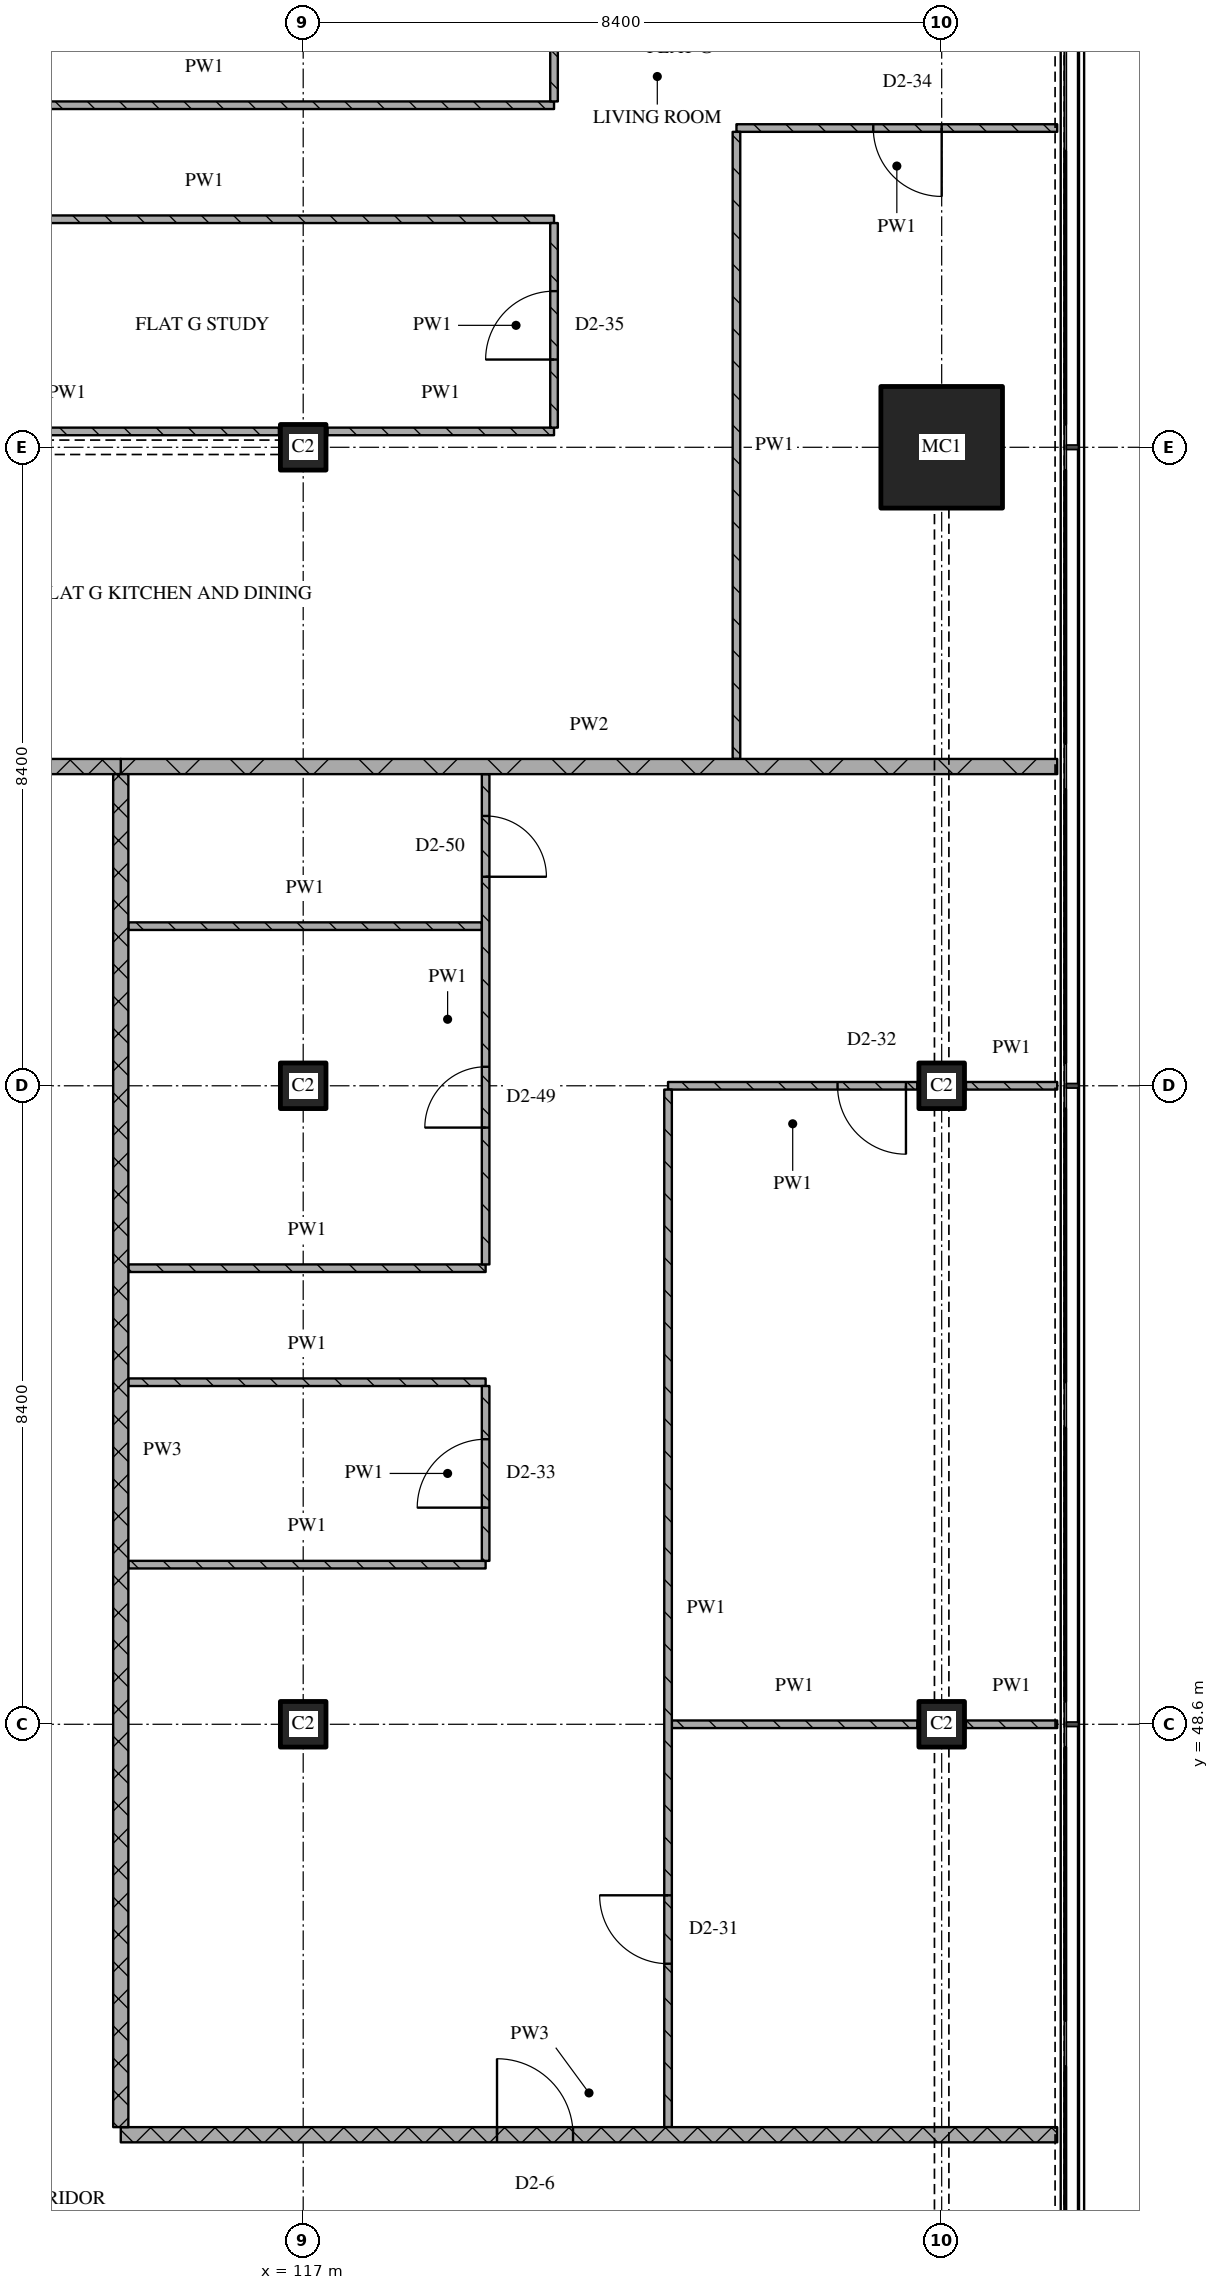
"""IFC4 building model, lengths in metres.
Left out: names, types, materials, properties, quantities, classifications, styles, units other than length and angle.
Written with IfcOpenShell. Run it as: python <this file> out.ifc"""

import sys

from ifc_helpers import new_model, si_unit, direction, frame, frame_2d, origin, origin_2d, place, context, subcontext, project, spatial, rectangle, extrude, element, fill, save


model = new_model("IFC4")
c1 = context("Model", 3, precision=1e-05, world=origin(), true_north=direction((0.0, 1.0)))
c2 = subcontext(c1, "Body", "Model", "MODEL_VIEW")
j1 = project(units=[si_unit("LENGTHUNIT", "METRE"), si_unit("PLANEANGLEUNIT", "RADIAN")], contexts=[c1])
p1 = place(None, origin())
s1 = spatial("IfcSite", under=j1, at=p1, CompositionType="ELEMENT")
p2 = place(p1, origin())
s2 = spatial("IfcBuilding", under=s1, at=p2, CompositionType="ELEMENT")
p3 = place(p2, frame((0.0, 0.0, 223.5)))
s3 = spatial("IfcBuildingStorey", under=s2, at=p3, CompositionType="ELEMENT", Elevation=223.5)
for number, where, z_axis, x_axis in (
    (1, (117.0, 48.6, 0.0), (0.0, 0.0, 1.0), (1.0, 0.0, 0.0)),
    (2, (117.0, 57.0, 0.0), (0.0, 0.0, 1.0), (1.0, 0.0, 0.0)),
    (3, (117.0, 65.4, 0.0), (0.0, 0.0, 1.0), (1.0, 0.0, 0.0)),
    (4, (125.4, 48.6, 0.0), (0.0, 0.0, 1.0), (1.0, 0.0, 0.0)),
    (5, (125.4, 57.0, 0.0), (0.0, 0.0, 1.0), (1.0, 0.0, 0.0)),
):
    element("IfcColumn", number, at=place(p3, frame(where, z_axis=z_axis, x_axis=x_axis)), inside=s3, PredefinedType="COLUMN", context=c2, shape_type="SweptSolid", body=[
        extrude(rectangle(XDim=0.6, YDim=0.6, at=origin_2d()), origin(), (0.0, 0.0, 1.0), 3.6),
    ])
p4 = place(p3, frame((125.4, 65.4, 0.0), z_axis=(0.0, 0.0, 1.0), x_axis=(1.0, 0.0, 0.0)))
e6 = element("IfcColumn", 6, at=p4, inside=s3, PredefinedType="COLUMN", context=c2, shape_type="SweptSolid", body=[
    extrude(rectangle(XDim=1.6, YDim=1.6, at=origin_2d()), origin(), (0.0, 0.0, 1.0), 3.6),
])
p5 = place(p3, frame((114.6, 43.2, 0.0), z_axis=(0.0, 0.0, 1.0), x_axis=(1.0, 0.0, 0.0)))
e7 = element("IfcWall", 7, at=p5, inside=s3, PredefinedType="PARTITIONING", context=c2, shape_type="SweptSolid", body=[
    extrude(rectangle(XDim=12.32, YDim=0.2, at=frame_2d((6.16, 0.0))), origin(), (0.0, 0.0, 1.0), 3.32),
])
p6 = place(p5, frame((4.95, 0.0, 0.0)))
e8 = element("IfcOpeningElement", 8, at=p6, cuts=e7, PredefinedType="OPENING", context=c2, shape_type="SweptSolid", body=[
    extrude(rectangle(XDim=1.0, YDim=2.1, at=frame_2d((0.5, 1.05))), frame((0.0, 0.11, 0.0), z_axis=(0.0, -1.0, 0.0), x_axis=(1.0, 0.0, 0.0)), (0.0, 0.0, 1.0), 0.22),
])
p7 = place(p3, frame((121.85, 48.6, 0.0), z_axis=(0.0, 0.0, 1.0), x_axis=(1.0, 0.0, 0.0)))
e9 = element("IfcWall", 9, at=p7, inside=s3, PredefinedType="PARTITIONING", context=c2, shape_type="SweptSolid", body=[
    extrude(rectangle(XDim=3.23, YDim=0.1, at=frame_2d((1.615, 0.0))), origin(), (0.0, 0.0, 1.0), 3.32),
])
p8 = place(p3, frame((125.72, 48.6, 0.0), z_axis=(0.0, 0.0, 1.0), x_axis=(1.0, 0.0, 0.0)))
e10 = element("IfcWall", 10, at=p8, inside=s3, PredefinedType="PARTITIONING", context=c2, shape_type="SweptSolid", body=[
    extrude(rectangle(XDim=1.2, YDim=0.1, at=frame_2d((0.6, 0.0))), origin(), (0.0, 0.0, 1.0), 3.32),
])
for number, where, z_axis, x_axis in (
    (11, (114.7, 50.7, 0.0), (0.0, 0.0, 1.0), (1.0, 0.0, 0.0)),
    (12, (114.7, 53.1, 0.0), (0.0, 0.0, 1.0), (1.0, 0.0, 0.0)),
    (13, (114.7, 54.6, 0.0), (0.0, 0.0, 1.0), (1.0, 0.0, 0.0)),
):
    element("IfcWall", number, at=place(p3, frame(where, z_axis=z_axis, x_axis=x_axis)), inside=s3, PredefinedType="PARTITIONING", context=c2, shape_type="SweptSolid", body=[
        extrude(rectangle(XDim=4.7, YDim=0.1, at=frame_2d((2.35, 0.0))), origin(), (0.0, 0.0, 1.0), 3.32),
    ])
p9 = place(p3, frame((125.08, 57.0, 0.0), z_axis=(0.0, 0.0, 1.0), x_axis=(-1.0, 0.0, 0.0)))
e14 = element("IfcWall", 14, at=p9, inside=s3, PredefinedType="PARTITIONING", context=c2, shape_type="SweptSolid", body=[
    extrude(rectangle(XDim=3.28, YDim=0.1, at=frame_2d((1.64, 0.0))), origin(), (0.0, 0.0, 1.0), 3.32),
])
p10 = place(p9, frame((0.15, 0.0, 0.0)))
e15 = element("IfcOpeningElement", 15, at=p10, cuts=e14, PredefinedType="OPENING", context=c2, shape_type="SweptSolid", body=[
    extrude(rectangle(XDim=0.9, YDim=2.1, at=frame_2d((0.45, 1.05))), frame((0.0, 0.06, 0.0), z_axis=(0.0, -1.0, 0.0), x_axis=(1.0, 0.0, 0.0)), (0.0, 0.0, 1.0), 0.12),
])
p11 = place(p3, frame((125.72, 57.0, 0.0), z_axis=(0.0, 0.0, 1.0), x_axis=(1.0, 0.0, 0.0)))
e16 = element("IfcWall", 16, at=p11, inside=s3, PredefinedType="PARTITIONING", context=c2, shape_type="SweptSolid", body=[
    extrude(rectangle(XDim=1.2, YDim=0.1, at=frame_2d((0.6, 0.0))), origin(), (0.0, 0.0, 1.0), 3.32),
])
p12 = place(p3, frame((114.7, 59.1, 0.0), z_axis=(0.0, 0.0, 1.0), x_axis=(1.0, 0.0, 0.0)))
e17 = element("IfcWall", 17, at=p12, inside=s3, PredefinedType="PARTITIONING", context=c2, shape_type="SweptSolid", body=[
    extrude(rectangle(XDim=4.65, YDim=0.1, at=frame_2d((2.325, 0.0))), origin(), (0.0, 0.0, 1.0), 3.32),
])
p13 = place(p3, frame((111.0, 61.2, 0.0), z_axis=(0.0, 0.0, 1.0), x_axis=(1.0, 0.0, 0.0)))
e18 = element("IfcWall", 18, at=p13, inside=s3, PredefinedType="PARTITIONING", context=c2, shape_type="SweptSolid", body=[
    extrude(rectangle(XDim=3.6, YDim=0.2, at=frame_2d((1.8, 0.0))), origin(), (0.0, 0.0, 1.0), 3.32),
])
p14 = place(p3, frame((114.6, 61.2, 0.0), z_axis=(0.0, 0.0, 1.0), x_axis=(1.0, 0.0, 0.0)))
e19 = element("IfcWall", 19, at=p14, inside=s3, PredefinedType="PARTITIONING", context=c2, shape_type="SweptSolid", body=[
    extrude(rectangle(XDim=12.32, YDim=0.2, at=frame_2d((6.16, 0.0))), origin(), (0.0, 0.0, 1.0), 3.32),
])
p15 = place(p3, frame((111.1, 65.609, 0.0), z_axis=(0.0, 0.0, 1.0), x_axis=(1.0, 0.0, 0.0)))
e20 = element("IfcWall", 20, at=p15, inside=s3, PredefinedType="PARTITIONING", context=c2, shape_type="SweptSolid", body=[
    extrude(rectangle(XDim=5.58, YDim=0.1, at=frame_2d((2.79, 0.0))), origin(), (0.0, 0.0, 1.0), 3.32),
])
p16 = place(p3, frame((117.32, 65.609, 0.0), z_axis=(0.0, 0.0, 1.0), x_axis=(1.0, 0.0, 0.0)))
e21 = element("IfcWall", 21, at=p16, inside=s3, PredefinedType="PARTITIONING", context=c2, shape_type="SweptSolid", body=[
    extrude(rectangle(XDim=2.98, YDim=0.1, at=frame_2d((1.49, 0.0))), origin(), (0.0, 0.0, 1.0), 3.32),
])
p17 = place(p3, frame((111.1, 68.4, 0.0), z_axis=(0.0, 0.0, 1.0), x_axis=(1.0, 0.0, 0.0)))
e22 = element("IfcWall", 22, at=p17, inside=s3, PredefinedType="PARTITIONING", context=c2, shape_type="SweptSolid", body=[
    extrude(rectangle(XDim=9.2, YDim=0.1, at=frame_2d((4.6, 0.0))), origin(), (0.0, 0.0, 1.0), 3.32),
])
p18 = place(p3, frame((126.92, 69.6, 0.0), z_axis=(0.0, 0.0, 1.0), x_axis=(-1.0, 0.0, 0.0)))
e23 = element("IfcWall", 23, at=p18, inside=s3, PredefinedType="PARTITIONING", context=c2, shape_type="SweptSolid", body=[
    extrude(rectangle(XDim=4.22, YDim=0.1, at=frame_2d((2.11, 0.0))), origin(), (0.0, 0.0, 1.0), 3.32),
])
p19 = place(p18, frame((1.52, 0.0, 0.0)))
e24 = element("IfcOpeningElement", 24, at=p19, cuts=e23, PredefinedType="OPENING", context=c2, shape_type="SweptSolid", body=[
    extrude(rectangle(XDim=0.9, YDim=2.1, at=frame_2d((0.45, 1.05))), frame((0.0, 0.06, 0.0), z_axis=(0.0, -1.0, 0.0), x_axis=(1.0, 0.0, 0.0)), (0.0, 0.0, 1.0), 0.12),
])
p20 = place(p3, frame((111.1, 69.9, 0.0), z_axis=(0.0, 0.0, 1.0), x_axis=(1.0, 0.0, 0.0)))
e25 = element("IfcWall", 25, at=p20, inside=s3, PredefinedType="PARTITIONING", context=c2, shape_type="SweptSolid", body=[
    extrude(rectangle(XDim=9.2, YDim=0.1, at=frame_2d((4.6, 0.0))), origin(), (0.0, 0.0, 1.0), 3.32),
])
p21 = place(p3, frame((114.6, 61.1, 0.0), z_axis=(0.0, 0.0, 1.0), x_axis=(0.0, -1.0, 0.0)))
e26 = element("IfcWall", 26, at=p21, inside=s3, PredefinedType="PARTITIONING", context=c2, shape_type="SweptSolid", body=[
    extrude(rectangle(XDim=17.8, YDim=0.2, at=frame_2d((8.9, 0.0))), origin(), (0.0, 0.0, 1.0), 3.32),
])
p22 = place(p3, frame((119.4, 50.75, 0.0), z_axis=(0.0, 0.0, 1.0), x_axis=(0.0, 1.0, 0.0)))
e27 = element("IfcWall", 27, at=p22, inside=s3, PredefinedType="PARTITIONING", context=c2, shape_type="SweptSolid", body=[
    extrude(rectangle(XDim=2.3, YDim=0.1, at=frame_2d((1.15, 0.0))), origin(), (0.0, 0.0, 1.0), 3.32),
])
p23 = place(p22, frame((0.7, 0.0, 0.0)))
e28 = element("IfcOpeningElement", 28, at=p23, cuts=e27, PredefinedType="OPENING", context=c2, shape_type="SweptSolid", body=[
    extrude(rectangle(XDim=0.9, YDim=2.1, at=frame_2d((0.45, 1.05))), frame((0.0, 0.06, 0.0), z_axis=(0.0, -1.0, 0.0), x_axis=(1.0, 0.0, 0.0)), (0.0, 0.0, 1.0), 0.12),
])
p24 = place(p3, frame((119.4, 54.65, 0.0), z_axis=(0.0, 0.0, 1.0), x_axis=(0.0, 1.0, 0.0)))
e29 = element("IfcWall", 29, at=p24, inside=s3, PredefinedType="PARTITIONING", context=c2, shape_type="SweptSolid", body=[
    extrude(rectangle(XDim=6.45, YDim=0.1, at=frame_2d((3.225, 0.0))), origin(), (0.0, 0.0, 1.0), 3.32),
])
p25 = place(p24, frame((1.8, 0.0, 0.0)))
e30 = element("IfcOpeningElement", 30, at=p25, cuts=e29, PredefinedType="OPENING", context=c2, shape_type="SweptSolid", body=[
    extrude(rectangle(XDim=0.8, YDim=2.1, at=frame_2d((0.4, 1.05))), frame((0.0, 0.06, 0.0), z_axis=(0.0, -1.0, 0.0), x_axis=(1.0, 0.0, 0.0)), (0.0, 0.0, 1.0), 0.12),
])
p26 = place(p24, frame((5.1, 0.0, 0.0)))
e31 = element("IfcOpeningElement", 31, at=p26, cuts=e29, PredefinedType="OPENING", context=c2, shape_type="SweptSolid", body=[
    extrude(rectangle(XDim=0.8, YDim=2.1, at=frame_2d((0.4, 1.05))), frame((0.0, 0.06, 0.0), z_axis=(0.0, -1.0, 0.0), x_axis=(1.0, 0.0, 0.0)), (0.0, 0.0, 1.0), 0.12),
])
p27 = place(p3, frame((120.3, 65.659, 0.0), z_axis=(0.0, 0.0, 1.0), x_axis=(0.0, 1.0, 0.0)))
e32 = element("IfcWall", 32, at=p27, inside=s3, PredefinedType="PARTITIONING", context=c2, shape_type="SweptSolid", body=[
    extrude(rectangle(XDim=2.691, YDim=0.1, at=frame_2d((1.346, 0.0))), origin(), (0.0, 0.0, 1.0), 3.32),
])
p28 = place(p27, frame((0.896, 0.0, 0.0)))
e33 = element("IfcOpeningElement", 33, at=p28, cuts=e32, PredefinedType="OPENING", context=c2, shape_type="SweptSolid", body=[
    extrude(rectangle(XDim=0.9, YDim=2.1, at=frame_2d((0.45, 1.05))), frame((0.0, 0.06, 0.0), z_axis=(0.0, -1.0, 0.0), x_axis=(1.0, 0.0, 0.0)), (0.0, 0.0, 1.0), 0.12),
])
p29 = place(p3, frame((120.3, 69.95, 0.0), z_axis=(0.0, 0.0, 1.0), x_axis=(0.0, 1.0, 0.0)))
e34 = element("IfcWall", 34, at=p29, inside=s3, PredefinedType="PARTITIONING", context=c2, shape_type="SweptSolid", body=[
    extrude(rectangle(XDim=5.37, YDim=0.1, at=frame_2d((2.685, 0.0))), origin(), (0.0, 0.0, 1.0), 3.32),
])
p30 = place(p29, frame((0.975, 0.0, 0.0)))
e35 = element("IfcOpeningElement", 35, at=p30, cuts=e34, PredefinedType="OPENING", context=c2, shape_type="SweptSolid", body=[
    extrude(rectangle(XDim=0.8, YDim=2.1, at=frame_2d((0.4, 1.05))), frame((0.0, 0.06, 0.0), z_axis=(0.0, -1.0, 0.0), x_axis=(1.0, 0.0, 0.0)), (0.0, 0.0, 1.0), 0.12),
])
p31 = place(p29, frame((3.775, 0.0, 0.0)))
e36 = element("IfcOpeningElement", 36, at=p31, cuts=e34, PredefinedType="OPENING", context=c2, shape_type="SweptSolid", body=[
    extrude(rectangle(XDim=0.9, YDim=2.1, at=frame_2d((0.45, 1.05))), frame((0.0, 0.06, 0.0), z_axis=(0.0, -1.0, 0.0), x_axis=(1.0, 0.0, 0.0)), (0.0, 0.0, 1.0), 0.12),
])
p32 = place(p3, frame((121.8, 56.95, 0.0), z_axis=(0.0, 0.0, 1.0), x_axis=(0.0, -1.0, 0.0)))
e37 = element("IfcWall", 37, at=p32, inside=s3, PredefinedType="PARTITIONING", context=c2, shape_type="SweptSolid", body=[
    extrude(rectangle(XDim=13.65, YDim=0.1, at=frame_2d((6.825, 0.0))), origin(), (0.0, 0.0, 1.0), 3.32),
])
p33 = place(p32, frame((10.6, 0.0, 0.0)))
e38 = element("IfcOpeningElement", 38, at=p33, cuts=e37, PredefinedType="OPENING", context=c2, shape_type="SweptSolid", body=[
    extrude(rectangle(XDim=0.9, YDim=2.1, at=frame_2d((0.45, 1.05))), frame((0.0, 0.06, 0.0), z_axis=(0.0, -1.0, 0.0), x_axis=(1.0, 0.0, 0.0)), (0.0, 0.0, 1.0), 0.12),
])
p34 = place(p3, frame((122.7, 69.55, 0.0), z_axis=(0.0, 0.0, 1.0), x_axis=(0.0, -1.0, 0.0)))
e39 = element("IfcWall", 39, at=p34, inside=s3, PredefinedType="PARTITIONING", context=c2, shape_type="SweptSolid", body=[
    extrude(rectangle(XDim=8.25, YDim=0.1, at=frame_2d((4.125, 0.0))), origin(), (0.0, 0.0, 1.0), 3.32),
])
p35 = place(p6, origin())
e40 = element("IfcDoor", 40, at=p35, inside=s3, OperationType="SINGLE_SWING_LEFT", PredefinedType="DOOR", context=c2, shape_type="SweptSolid", body=[
    extrude(rectangle(XDim=1.0, YDim=2.1, at=frame_2d((0.5, 1.05))), frame((0.0, 0.025, 0.0), z_axis=(0.0, -1.0, 0.0), x_axis=(1.0, 0.0, 0.0)), (0.0, 0.0, 1.0), 0.05),
])
fill(e8, e40)
p36 = place(p10, origin())
e41 = element("IfcDoor", 41, at=p36, inside=s3, OperationType="SINGLE_SWING_LEFT", PredefinedType="DOOR", context=c2, shape_type="SweptSolid", body=[
    extrude(rectangle(XDim=0.9, YDim=2.1, at=frame_2d((0.45, 1.05))), frame((0.0, 0.025, 0.0), z_axis=(0.0, -1.0, 0.0), x_axis=(1.0, 0.0, 0.0)), (0.0, 0.0, 1.0), 0.05),
])
fill(e15, e41)
p37 = place(p19, origin())
e42 = element("IfcDoor", 42, at=p37, inside=s3, OperationType="SINGLE_SWING_LEFT", PredefinedType="DOOR", context=c2, shape_type="SweptSolid", body=[
    extrude(rectangle(XDim=0.9, YDim=2.1, at=frame_2d((0.45, 1.05))), frame((0.0, 0.025, 0.0), z_axis=(0.0, -1.0, 0.0), x_axis=(1.0, 0.0, 0.0)), (0.0, 0.0, 1.0), 0.05),
])
fill(e24, e42)
p38 = place(p23, origin())
e43 = element("IfcDoor", 43, at=p38, inside=s3, OperationType="SINGLE_SWING_LEFT", PredefinedType="DOOR", context=c2, shape_type="SweptSolid", body=[
    extrude(rectangle(XDim=0.9, YDim=2.1, at=frame_2d((0.45, 1.05))), frame((0.0, 0.025, 0.0), z_axis=(0.0, -1.0, 0.0), x_axis=(1.0, 0.0, 0.0)), (0.0, 0.0, 1.0), 0.05),
])
fill(e28, e43)
p39 = place(p25, origin())
e44 = element("IfcDoor", 44, at=p39, inside=s3, OperationType="SINGLE_SWING_LEFT", PredefinedType="DOOR", context=c2, shape_type="SweptSolid", body=[
    extrude(rectangle(XDim=0.8, YDim=2.1, at=frame_2d((0.4, 1.05))), frame((0.0, 0.025, 0.0), z_axis=(0.0, -1.0, 0.0), x_axis=(1.0, 0.0, 0.0)), (0.0, 0.0, 1.0), 0.05),
])
fill(e30, e44)
p40 = place(p26, origin())
e45 = element("IfcDoor", 45, at=p40, inside=s3, OperationType="SINGLE_SWING_RIGHT", PredefinedType="DOOR", context=c2, shape_type="SweptSolid", body=[
    extrude(rectangle(XDim=0.8, YDim=2.1, at=frame_2d((0.4, 1.05))), frame((0.0, 0.025, 0.0), z_axis=(0.0, -1.0, 0.0), x_axis=(1.0, 0.0, 0.0)), (0.0, 0.0, 1.0), 0.05),
])
fill(e31, e45)
p41 = place(p28, origin())
e46 = element("IfcDoor", 46, at=p41, inside=s3, OperationType="SINGLE_SWING_LEFT", PredefinedType="DOOR", context=c2, shape_type="SweptSolid", body=[
    extrude(rectangle(XDim=0.9, YDim=2.1, at=frame_2d((0.45, 1.05))), frame((0.0, 0.025, 0.0), z_axis=(0.0, -1.0, 0.0), x_axis=(1.0, 0.0, 0.0)), (0.0, 0.0, 1.0), 0.05),
])
fill(e33, e46)
p42 = place(p33, origin())
e47 = element("IfcDoor", 47, at=p42, inside=s3, OperationType="SINGLE_SWING_RIGHT", PredefinedType="DOOR", context=c2, shape_type="SweptSolid", body=[
    extrude(rectangle(XDim=0.9, YDim=2.1, at=frame_2d((0.45, 1.05))), frame((0.0, 0.025, 0.0), z_axis=(0.0, -1.0, 0.0), x_axis=(1.0, 0.0, 0.0)), (0.0, 0.0, 1.0), 0.05),
])
fill(e38, e47)
save(model, sys.argv[1])
